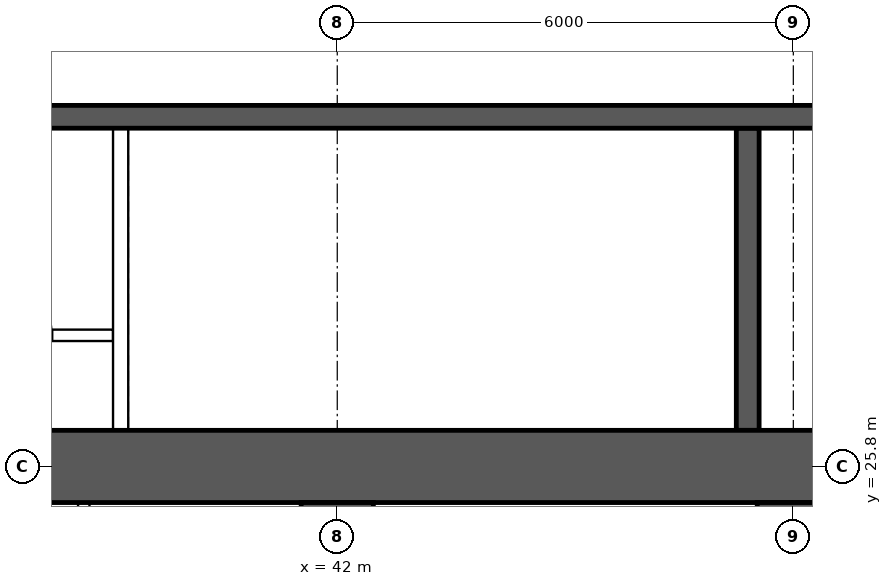
"""IFC4 building model, lengths in metres.
Left out: names, types, materials, properties, quantities, classifications, styles, units other than length and angle.
Written with IfcOpenShell. Run it as: python <this file> out.ifc"""

import sys

from ifc_helpers import new_model, si_unit, direction, frame, frame_2d, origin, place, context, subcontext, project, spatial, rectangle, extrude, element, save


model = new_model("IFC4")
c1 = context("Model", 3, precision=1e-05, world=origin(), true_north=direction((0.0, 1.0)))
c2 = subcontext(c1, "Body", "Model", "MODEL_VIEW")
j1 = project(units=[si_unit("LENGTHUNIT", "METRE"), si_unit("PLANEANGLEUNIT", "RADIAN")], contexts=[c1])
p1 = place(None, origin())
s1 = spatial("IfcSite", under=j1, at=p1, CompositionType="ELEMENT")
p2 = place(p1, origin())
s2 = spatial("IfcBuilding", under=s1, at=p2, CompositionType="ELEMENT")
p3 = place(p2, frame((0.0, 0.0, 114.4)))
s3 = spatial("IfcBuildingStorey", under=s2, at=p3, CompositionType="ELEMENT", Elevation=114.4)
p4 = place(p3, frame((18.0, 25.8, 0.0), z_axis=(0.0, 0.0, 1.0), x_axis=(1.0, 0.0, 0.0)))
e1 = element("IfcWall", 1, at=p4, inside=s3, PredefinedType="SHEAR", context=c2, shape_type="SweptSolid", body=[
    extrude(rectangle(XDim=48.0, YDim=0.95, at=frame_2d((24.0, 0.0))), origin(), (0.0, 0.0, 1.0), 3.75),
])
p5 = place(p3, frame((18.475, 30.4, 0.0), z_axis=(0.0, 0.0, 1.0), x_axis=(1.0, 0.0, 0.0)))
e2 = element("IfcWall", 2, at=p5, inside=s3, PredefinedType="SHEAR", context=c2, shape_type="SweptSolid", body=[
    extrude(rectangle(XDim=47.05, YDim=0.3, at=frame_2d((23.525, 0.0))), origin(), (0.0, 0.0, 1.0), 3.75),
])
p6 = place(p5, frame((0.4, 0.0, 0.0)))
e3 = element("IfcOpeningElement", 3, at=p6, cuts=e2, PredefinedType="OPENING", context=c2, shape_type="SweptSolid", body=[
    extrude(rectangle(XDim=1.0, YDim=2.1, at=frame_2d((0.5, 1.05))), frame((0.0, 0.16, 0.0), z_axis=(0.0, -1.0, 0.0), x_axis=(1.0, 0.0, 0.0)), (0.0, 0.0, 1.0), 0.32),
])
p7 = place(p5, frame((45.65, 0.0, 0.0)))
e4 = element("IfcOpeningElement", 4, at=p7, cuts=e2, PredefinedType="OPENING", context=c2, shape_type="SweptSolid", body=[
    extrude(rectangle(XDim=1.0, YDim=2.1, at=frame_2d((0.5, 1.05))), frame((0.0, 0.16, 0.0), z_axis=(0.0, -1.0, 0.0), x_axis=(1.0, 0.0, 0.0)), (0.0, 0.0, 1.0), 0.32),
])
p8 = place(p5, frame((8.275, 0.0, 0.0)))
e5 = element("IfcOpeningElement", 5, at=p8, cuts=e2, PredefinedType="OPENING", context=c2, shape_type="SweptSolid", body=[
    extrude(rectangle(XDim=1.1, YDim=2.1, at=frame_2d((0.55, 1.05))), frame((0.0, 0.16, 0.0), z_axis=(0.0, -1.0, 0.0), x_axis=(1.0, 0.0, 0.0)), (0.0, 0.0, 1.0), 0.32),
])
p9 = place(p5, frame((10.875, 0.0, 0.0)))
e6 = element("IfcOpeningElement", 6, at=p9, cuts=e2, PredefinedType="OPENING", context=c2, shape_type="SweptSolid", body=[
    extrude(rectangle(XDim=1.1, YDim=2.1, at=frame_2d((0.55, 1.05))), frame((0.0, 0.16, 0.0), z_axis=(0.0, -1.0, 0.0), x_axis=(1.0, 0.0, 0.0)), (0.0, 0.0, 1.0), 0.32),
])
p10 = place(p5, frame((13.475, 0.0, 0.0)))
e7 = element("IfcOpeningElement", 7, at=p10, cuts=e2, PredefinedType="OPENING", context=c2, shape_type="SweptSolid", body=[
    extrude(rectangle(XDim=1.1, YDim=2.1, at=frame_2d((0.55, 1.05))), frame((0.0, 0.16, 0.0), z_axis=(0.0, -1.0, 0.0), x_axis=(1.0, 0.0, 0.0)), (0.0, 0.0, 1.0), 0.32),
])
p11 = place(p5, frame((16.075, 0.0, 0.0)))
e8 = element("IfcOpeningElement", 8, at=p11, cuts=e2, PredefinedType="OPENING", context=c2, shape_type="SweptSolid", body=[
    extrude(rectangle(XDim=1.1, YDim=2.1, at=frame_2d((0.55, 1.05))), frame((0.0, 0.16, 0.0), z_axis=(0.0, -1.0, 0.0), x_axis=(1.0, 0.0, 0.0)), (0.0, 0.0, 1.0), 0.32),
])
p12 = place(p5, frame((18.85, 0.0, 0.0)))
e9 = element("IfcOpeningElement", 9, at=p12, cuts=e2, PredefinedType="OPENING", context=c2, shape_type="SweptSolid", body=[
    extrude(rectangle(XDim=0.9, YDim=2.1, at=frame_2d((0.45, 1.05))), frame((0.0, 0.16, 0.0), z_axis=(0.0, -1.0, 0.0), x_axis=(1.0, 0.0, 0.0)), (0.0, 0.0, 1.0), 0.32),
])
p13 = place(p5, frame((30.142, 0.0, 0.0)))
e10 = element("IfcOpeningElement", 10, at=p13, cuts=e2, PredefinedType="OPENING", context=c2, shape_type="SweptSolid", body=[
    extrude(rectangle(XDim=1.1, YDim=2.1, at=frame_2d((0.55, 1.05))), frame((0.0, 0.16, 0.0), z_axis=(0.0, -1.0, 0.0), x_axis=(1.0, 0.0, 0.0)), (0.0, 0.0, 1.0), 0.32),
])
p14 = place(p5, frame((33.675, 0.0, 0.0)))
e11 = element("IfcOpeningElement", 11, at=p14, cuts=e2, PredefinedType="OPENING", context=c2, shape_type="SweptSolid", body=[
    extrude(rectangle(XDim=1.1, YDim=2.1, at=frame_2d((0.55, 1.05))), frame((0.0, 0.16, 0.0), z_axis=(0.0, -1.0, 0.0), x_axis=(1.0, 0.0, 0.0)), (0.0, 0.0, 1.0), 0.32),
])
p15 = place(p5, frame((37.208, 0.0, 0.0)))
e12 = element("IfcOpeningElement", 12, at=p15, cuts=e2, PredefinedType="OPENING", context=c2, shape_type="SweptSolid", body=[
    extrude(rectangle(XDim=1.1, YDim=2.1, at=frame_2d((0.55, 1.05))), frame((0.0, 0.16, 0.0), z_axis=(0.0, -1.0, 0.0), x_axis=(1.0, 0.0, 0.0)), (0.0, 0.0, 1.0), 0.32),
])
p16 = place(p3, frame((47.4, 26.275, 0.0), z_axis=(0.0, 0.0, 1.0), x_axis=(0.0, 1.0, 0.0)))
e13 = element("IfcWall", 13, at=p16, inside=s3, PredefinedType="SHEAR", context=c2, shape_type="SweptSolid", body=[
    extrude(rectangle(XDim=3.975, YDim=0.3, at=frame_2d((1.988, 0.0))), origin(), (0.0, 0.0, 1.0), 3.75),
])
for number, where, z_axis, x_axis in (
    (14, (42.0, 16.0, 0.0), (0.0, 0.0, 1.0), (0.0, 1.0, 0.0)),
    (15, (48.0, 16.0, 0.0), (0.0, 0.0, 1.0), (0.0, 1.0, 0.0)),
):
    element("IfcWall", number, at=place(p3, frame(where, z_axis=z_axis, x_axis=x_axis)), inside=s3, PredefinedType="SHEAR", context=c2, shape_type="SweptSolid", body=[
        extrude(rectangle(XDim=9.325, YDim=0.95, at=frame_2d((4.663, 0.0))), origin(), (0.0, 0.0, 1.0), 3.75),
    ])
p17 = place(p3, frame((36.55, 27.525, 0.0), z_axis=(0.0, 0.0, 1.0), x_axis=(1.0, 0.0, 0.0)))
e16 = element("IfcWall", 16, at=p17, inside=s3, PredefinedType="SOLIDWALL", context=c2, shape_type="SweptSolid", body=[
    extrude(rectangle(XDim=2.5, YDim=0.15, at=frame_2d((1.25, 0.0))), origin(), (0.0, 0.0, 1.0), 3.5),
])
p18 = place(p17, frame((0.8, 0.0, 0.0)))
e17 = element("IfcOpeningElement", 17, at=p18, cuts=e16, PredefinedType="OPENING", context=c2, shape_type="SweptSolid", body=[
    extrude(rectangle(XDim=0.9, YDim=2.1, at=frame_2d((0.45, 1.05))), frame((0.0, 0.085, 0.0), z_axis=(0.0, -1.0, 0.0), x_axis=(1.0, 0.0, 0.0)), (0.0, 0.0, 1.0), 0.17),
])
p19 = place(p3, frame((39.15, 26.275, 0.0), z_axis=(0.0, 0.0, 1.0), x_axis=(0.0, 1.0, 0.0)))
e18 = element("IfcWall", 18, at=p19, inside=s3, PredefinedType="SOLIDWALL", context=c2, shape_type="SweptSolid", body=[
    extrude(rectangle(XDim=3.975, YDim=0.2, at=frame_2d((1.988, 0.0))), origin(), (0.0, 0.0, 1.0), 3.5),
])
p20 = place(p3, frame((38.665, 16.1, 0.0), z_axis=(0.0, 0.0, 1.0), x_axis=(0.0, 1.0, 0.0)))
e19 = element("IfcWall", 19, at=p20, inside=s3, PredefinedType="PARTITIONING", context=c2, shape_type="SweptSolid", body=[
    extrude(rectangle(XDim=9.225, YDim=0.15, at=frame_2d((4.612, 0.0))), origin(), (0.0, 0.0, 1.0), 3.5),
])
save(model, sys.argv[1])
